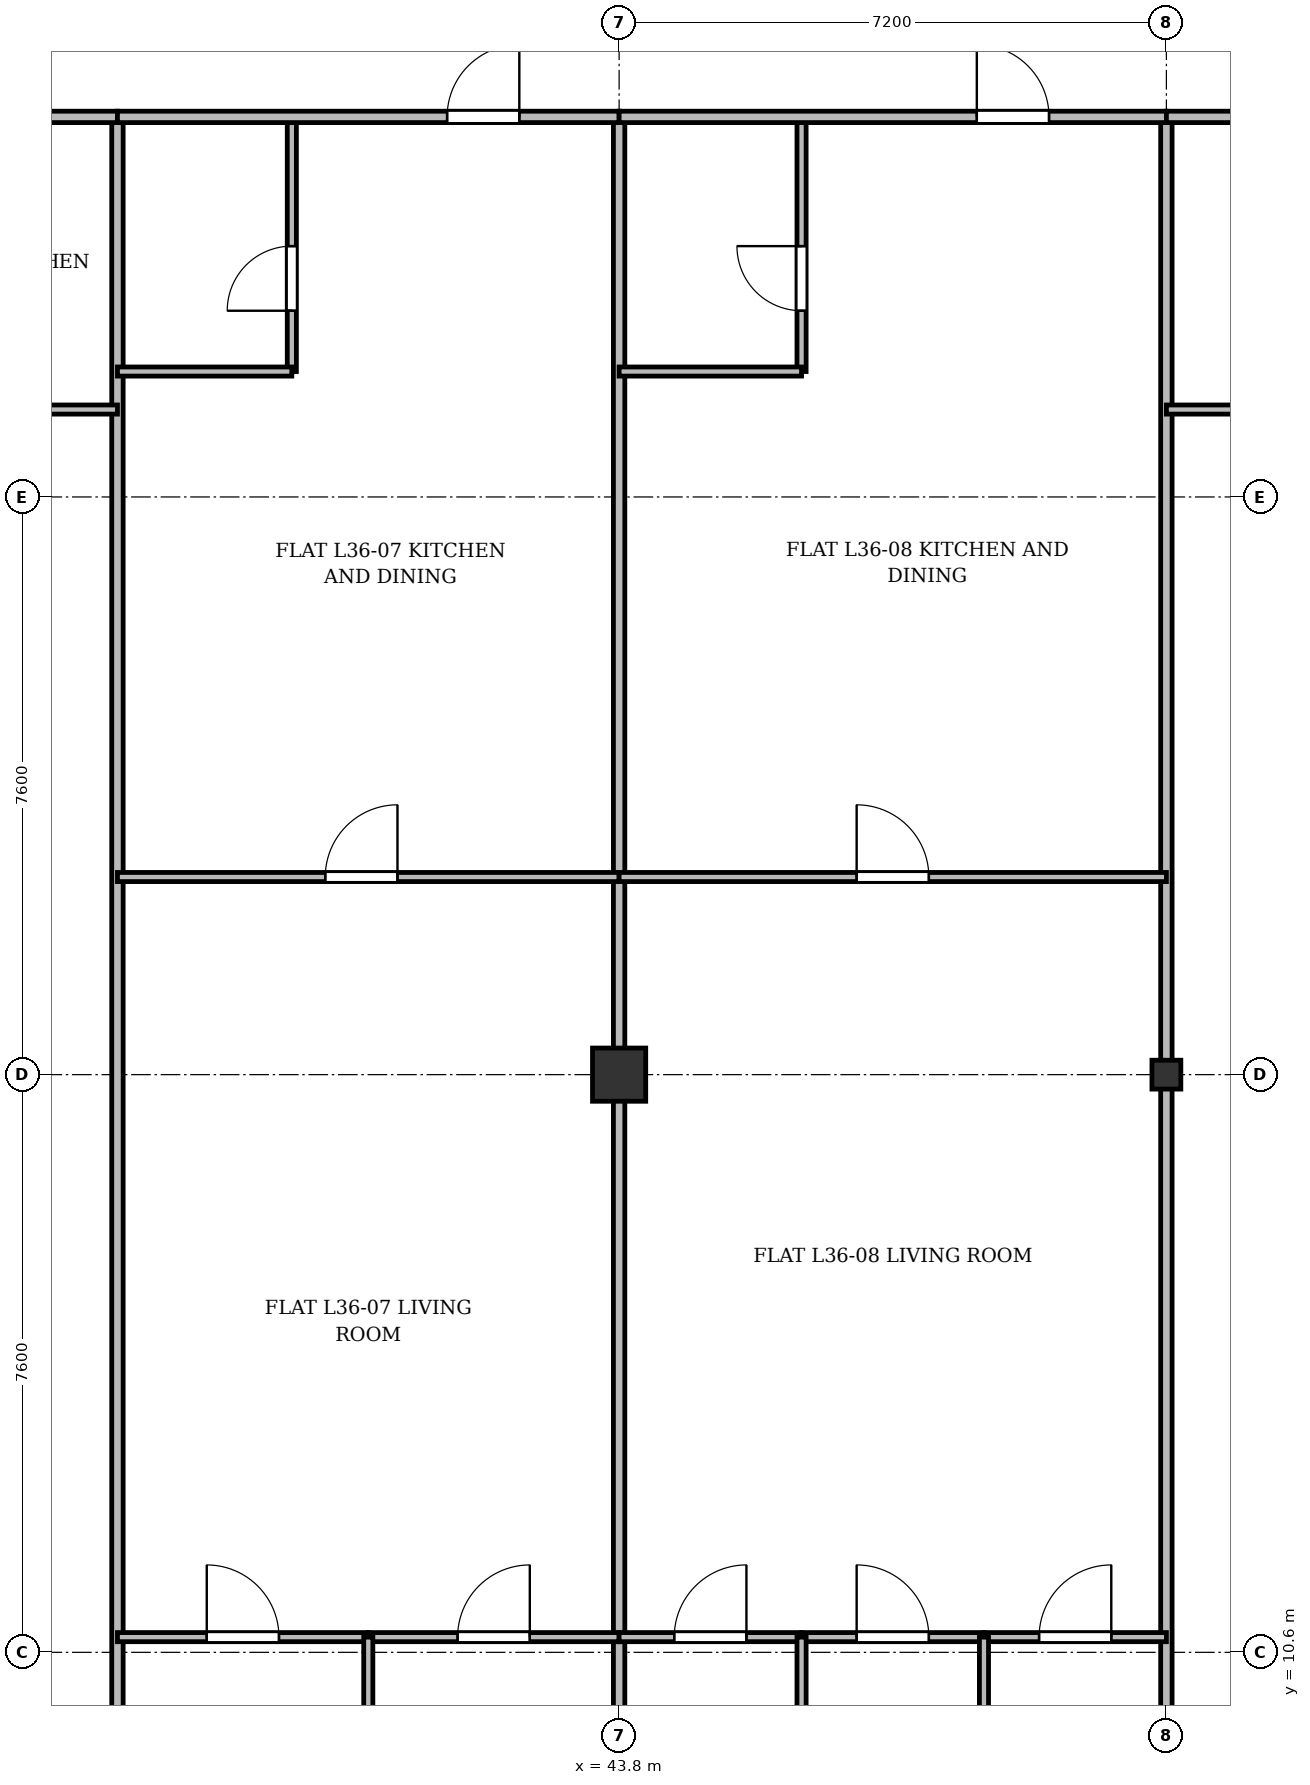
"""IFC4 building model, lengths in metres.
Left out: names, types, materials, properties, quantities, classifications, styles, units other than length and angle.
Written with IfcOpenShell. Run it as: python <this file> out.ifc"""

import sys

from ifc_helpers import new_model, si_unit, direction, frame, frame_2d, origin, origin_2d, place, context, subcontext, project, spatial, rectangle, i_section, extrude, source, transform, mapped, element, fill, save


model = new_model("IFC4")
c1 = context("Model", 3, precision=1e-05, world=origin(), true_north=direction((0.0, 1.0)))
c2 = subcontext(c1, "Body", "Model", "MODEL_VIEW")
j1 = project(units=[si_unit("LENGTHUNIT", "METRE"), si_unit("PLANEANGLEUNIT", "RADIAN")], contexts=[c1])
p1 = place(None, origin())
s1 = spatial("IfcSite", under=j1, at=p1, CompositionType="ELEMENT")
p2 = place(p1, origin())
s2 = spatial("IfcBuilding", under=s1, at=p2, CompositionType="ELEMENT")
p3 = place(p2, frame((0.0, 0.0, 139.3)))
s3 = spatial("IfcBuildingStorey", under=s2, at=p3, CompositionType="ELEMENT", Elevation=139.3)
m1 = source(origin(), c2, "Body", "SweptSolid", [
    extrude(rectangle(XDim=0.7, YDim=0.7, at=origin_2d()), origin(), (0.0, 0.0, 1.0), 3.6),
])
p4 = place(p3, frame((43.8, 18.2, 0.0), z_axis=(0.0, 0.0, 1.0), x_axis=(1.0, 0.0, 0.0)))
e1 = element("IfcColumn", 1, at=p4, inside=s3, PredefinedType="COLUMN", context=c2, shape_type="MappedRepresentation", body=[
    mapped(m1, transform((0.0, 0.0, 0.0), x_axis=(1.0, 0.0, 0.0), y_axis=(0.0, 1.0, 0.0), z_axis=(0.0, 0.0, 1.0), scale=1.0)),
])
m2 = source(origin(), c2, "Body", "SweptSolid", [
    extrude(i_section(OverallWidth=0.38, OverallDepth=0.38, WebThickness=0.02, FlangeThickness=0.03, at=origin_2d()), origin(), (0.0, 0.0, 1.0), 3.6),
])
p5 = place(p3, frame((51.0, 18.2, 0.0), z_axis=(0.0, 0.0, 1.0), x_axis=(1.0, 0.0, 0.0)))
e2 = element("IfcColumn", 2, at=p5, inside=s3, PredefinedType="COLUMN", context=c2, shape_type="MappedRepresentation", body=[
    mapped(m2, transform((0.0, 0.0, 0.0), x_axis=(1.0, 0.0, 0.0), y_axis=(0.0, 1.0, 0.0), z_axis=(0.0, 0.0, 1.0), scale=1.0)),
])
p6 = place(p3, frame((37.2, 3.525, 0.0), z_axis=(0.0, 0.0, 1.0), x_axis=(0.0, 1.0, 0.0)))
e3 = element("IfcWall", 3, at=p6, inside=s3, PredefinedType="PARTITIONING", context=c2, shape_type="SweptSolid", body=[
    extrude(rectangle(XDim=27.275, YDim=0.15, at=frame_2d((13.638, 0.0))), origin(), (0.0, 0.0, 1.0), 2.75),
])
for number, where, z_axis, x_axis in (
    (4, (43.8, 3.525, 0.0), (0.0, 0.0, 1.0), (0.0, 1.0, 0.0)),
    (5, (51.0, 3.525, 0.0), (0.0, 0.0, 1.0), (0.0, 1.0, 0.0)),
):
    element("IfcWall", number, at=place(p3, frame(where, z_axis=z_axis, x_axis=x_axis)), inside=s3, PredefinedType="PARTITIONING", context=c2, shape_type="SweptSolid", body=[
        extrude(rectangle(XDim=27.275, YDim=0.15, at=frame_2d((13.638, 0.0))), origin(), (0.0, 0.0, 1.0), 2.85),
    ])
p7 = place(p3, frame((30.6, 30.8, 0.0), z_axis=(0.0, 0.0, 1.0), x_axis=(1.0, 0.0, 0.0)))
e6 = element("IfcWall", 6, at=p7, inside=s3, PredefinedType="PARTITIONING", context=c2, shape_type="SweptSolid", body=[
    extrude(rectangle(XDim=6.6, YDim=0.15, at=frame_2d((3.3, 0.0))), origin(), (0.0, 0.0, 1.0), 2.85),
])
p8 = place(p7, frame((2.734, 0.0, 0.0)))
e7 = element("IfcOpeningElement", 7, at=p8, cuts=e6, PredefinedType="OPENING", context=c2, shape_type="SweptSolid", body=[
    extrude(rectangle(XDim=0.95, YDim=2.15, at=frame_2d((0.475, 1.075))), frame((0.0, 0.085, 0.0), z_axis=(0.0, -1.0, 0.0), x_axis=(1.0, 0.0, 0.0)), (0.0, 0.0, 1.0), 0.17),
])
p9 = place(p3, frame((30.6, 26.95, 0.0), z_axis=(0.0, 0.0, 1.0), x_axis=(1.0, 0.0, 0.0)))
e8 = element("IfcWall", 8, at=p9, inside=s3, PredefinedType="PARTITIONING", context=c2, shape_type="SweptSolid", body=[
    extrude(rectangle(XDim=6.6, YDim=0.12, at=frame_2d((3.3, 0.0))), origin(), (0.0, 0.0, 1.0), 2.85),
])
p10 = place(p9, frame((2.734, 0.0, 0.0)))
e9 = element("IfcOpeningElement", 9, at=p10, cuts=e8, PredefinedType="OPENING", context=c2, shape_type="SweptSolid", body=[
    extrude(rectangle(XDim=0.95, YDim=2.15, at=frame_2d((0.475, 1.075))), frame((0.0, 0.07, 0.0), z_axis=(0.0, -1.0, 0.0), x_axis=(1.0, 0.0, 0.0)), (0.0, 0.0, 1.0), 0.14),
])
p11 = place(p3, frame((37.2, 20.8, 0.0), z_axis=(0.0, 0.0, 1.0), x_axis=(1.0, 0.0, 0.0)))
e10 = element("IfcWall", 10, at=p11, inside=s3, PredefinedType="PARTITIONING", context=c2, shape_type="SweptSolid", body=[
    extrude(rectangle(XDim=6.6, YDim=0.12, at=frame_2d((3.3, 0.0))), origin(), (0.0, 0.0, 1.0), 2.85),
])
p12 = place(p11, frame((2.734, 0.0, 0.0)))
e11 = element("IfcOpeningElement", 11, at=p12, cuts=e10, PredefinedType="OPENING", context=c2, shape_type="SweptSolid", body=[
    extrude(rectangle(XDim=0.95, YDim=2.15, at=frame_2d((0.475, 1.075))), frame((0.0, 0.07, 0.0), z_axis=(0.0, -1.0, 0.0), x_axis=(1.0, 0.0, 0.0)), (0.0, 0.0, 1.0), 0.14),
])
p13 = place(p3, frame((39.494, 27.45, 0.0), z_axis=(0.0, 0.0, 1.0), x_axis=(0.0, 1.0, 0.0)))
e12 = element("IfcWall", 12, at=p13, inside=s3, PredefinedType="PARTITIONING", context=c2, shape_type="SweptSolid", body=[
    extrude(rectangle(XDim=3.35, YDim=0.12, at=frame_2d((1.675, 0.0))), origin(), (0.0, 0.0, 1.0), 3.35),
])
p14 = place(p13, frame((0.8, 0.0, 0.0)))
e13 = element("IfcOpeningElement", 13, at=p14, cuts=e12, PredefinedType="OPENING", context=c2, shape_type="SweptSolid", body=[
    extrude(rectangle(XDim=0.85, YDim=2.1, at=frame_2d((0.425, 1.05))), frame((0.0, 0.07, 0.0), z_axis=(0.0, -1.0, 0.0), x_axis=(1.0, 0.0, 0.0)), (0.0, 0.0, 1.0), 0.14),
])
p15 = place(p3, frame((37.2, 27.45, 0.0), z_axis=(0.0, 0.0, 1.0), x_axis=(1.0, 0.0, 0.0)))
e14 = element("IfcWall", 14, at=p15, inside=s3, PredefinedType="PARTITIONING", context=c2, shape_type="SweptSolid", body=[
    extrude(rectangle(XDim=2.294, YDim=0.12, at=frame_2d((1.147, 0.0))), origin(), (0.0, 0.0, 1.0), 3.35),
])
p16 = place(p3, frame((37.2, 30.8, 0.0), z_axis=(0.0, 0.0, 1.0), x_axis=(1.0, 0.0, 0.0)))
e15 = element("IfcWall", 15, at=p16, inside=s3, PredefinedType="PARTITIONING", context=c2, shape_type="SweptSolid", body=[
    extrude(rectangle(XDim=6.6, YDim=0.15, at=frame_2d((3.3, 0.0))), origin(), (0.0, 0.0, 1.0), 2.85),
])
p17 = place(p16, frame((4.337, 0.0, 0.0)))
e16 = element("IfcOpeningElement", 16, at=p17, cuts=e15, PredefinedType="OPENING", context=c2, shape_type="SweptSolid", body=[
    extrude(rectangle(XDim=0.95, YDim=2.15, at=frame_2d((0.475, 1.075))), frame((0.0, 0.085, 0.0), z_axis=(0.0, -1.0, 0.0), x_axis=(1.0, 0.0, 0.0)), (0.0, 0.0, 1.0), 0.17),
])
p18 = place(p3, frame((37.2, 10.8, 0.0), z_axis=(0.0, 0.0, 1.0), x_axis=(1.0, 0.0, 0.0)))
e17 = element("IfcWall", 17, at=p18, inside=s3, PredefinedType="PARTITIONING", context=c2, shape_type="SweptSolid", body=[
    extrude(rectangle(XDim=3.3, YDim=0.12, at=frame_2d((1.65, 0.0))), origin(), (0.0, 0.0, 1.0), 3.0),
])
p19 = place(p18, frame((1.175, 0.0, 0.0)))
e18 = element("IfcOpeningElement", 18, at=p19, cuts=e17, PredefinedType="OPENING", context=c2, shape_type="SweptSolid", body=[
    extrude(rectangle(XDim=0.95, YDim=2.15, at=frame_2d((0.475, 1.075))), frame((0.0, 0.07, 0.0), z_axis=(0.0, -1.0, 0.0), x_axis=(1.0, 0.0, 0.0)), (0.0, 0.0, 1.0), 0.14),
])
p20 = place(p3, frame((40.5, 10.8, 0.0), z_axis=(0.0, 0.0, 1.0), x_axis=(1.0, 0.0, 0.0)))
e19 = element("IfcWall", 19, at=p20, inside=s3, PredefinedType="PARTITIONING", context=c2, shape_type="SweptSolid", body=[
    extrude(rectangle(XDim=3.3, YDim=0.12, at=frame_2d((1.65, 0.0))), origin(), (0.0, 0.0, 1.0), 2.85),
])
p21 = place(p20, frame((1.175, 0.0, 0.0)))
e20 = element("IfcOpeningElement", 20, at=p21, cuts=e19, PredefinedType="OPENING", context=c2, shape_type="SweptSolid", body=[
    extrude(rectangle(XDim=0.95, YDim=2.15, at=frame_2d((0.475, 1.075))), frame((0.0, 0.07, 0.0), z_axis=(0.0, -1.0, 0.0), x_axis=(1.0, 0.0, 0.0)), (0.0, 0.0, 1.0), 0.14),
])
p22 = place(p3, frame((40.5, 3.525, 0.0), z_axis=(0.0, 0.0, 1.0), x_axis=(0.0, 1.0, 0.0)))
e21 = element("IfcWall", 21, at=p22, inside=s3, PredefinedType="PARTITIONING", context=c2, shape_type="SweptSolid", body=[
    extrude(rectangle(XDim=7.275, YDim=0.12, at=frame_2d((3.638, 0.0))), origin(), (0.0, 0.0, 1.0), 2.75),
])
p23 = place(p3, frame((43.8, 20.8, 0.0), z_axis=(0.0, 0.0, 1.0), x_axis=(1.0, 0.0, 0.0)))
e22 = element("IfcWall", 22, at=p23, inside=s3, PredefinedType="PARTITIONING", context=c2, shape_type="SweptSolid", body=[
    extrude(rectangle(XDim=7.2, YDim=0.12, at=frame_2d((3.6, 0.0))), origin(), (0.0, 0.0, 1.0), 2.85),
])
p24 = place(p23, frame((3.125, 0.0, 0.0)))
e23 = element("IfcOpeningElement", 23, at=p24, cuts=e22, PredefinedType="OPENING", context=c2, shape_type="SweptSolid", body=[
    extrude(rectangle(XDim=0.95, YDim=2.15, at=frame_2d((0.475, 1.075))), frame((0.0, 0.07, 0.0), z_axis=(0.0, -1.0, 0.0), x_axis=(1.0, 0.0, 0.0)), (0.0, 0.0, 1.0), 0.14),
])
p25 = place(p3, frame((46.2, 27.45, 0.0), z_axis=(0.0, 0.0, 1.0), x_axis=(0.0, 1.0, 0.0)))
e24 = element("IfcWall", 24, at=p25, inside=s3, PredefinedType="PARTITIONING", context=c2, shape_type="SweptSolid", body=[
    extrude(rectangle(XDim=3.35, YDim=0.12, at=frame_2d((1.675, 0.0))), origin(), (0.0, 0.0, 1.0), 3.35),
])
p26 = place(p25, frame((0.8, 0.0, 0.0)))
e25 = element("IfcOpeningElement", 25, at=p26, cuts=e24, PredefinedType="OPENING", context=c2, shape_type="SweptSolid", body=[
    extrude(rectangle(XDim=0.85, YDim=2.1, at=frame_2d((0.425, 1.05))), frame((0.0, 0.07, 0.0), z_axis=(0.0, -1.0, 0.0), x_axis=(1.0, 0.0, 0.0)), (0.0, 0.0, 1.0), 0.14),
])
p27 = place(p3, frame((43.8, 27.45, 0.0), z_axis=(0.0, 0.0, 1.0), x_axis=(1.0, 0.0, 0.0)))
e26 = element("IfcWall", 26, at=p27, inside=s3, PredefinedType="PARTITIONING", context=c2, shape_type="SweptSolid", body=[
    extrude(rectangle(XDim=2.4, YDim=0.12, at=frame_2d((1.2, 0.0))), origin(), (0.0, 0.0, 1.0), 2.85),
])
p28 = place(p3, frame((43.8, 30.8, 0.0), z_axis=(0.0, 0.0, 1.0), x_axis=(1.0, 0.0, 0.0)))
e27 = element("IfcWall", 27, at=p28, inside=s3, PredefinedType="PARTITIONING", context=c2, shape_type="SweptSolid", body=[
    extrude(rectangle(XDim=7.2, YDim=0.15, at=frame_2d((3.6, 0.0))), origin(), (0.0, 0.0, 1.0), 2.85),
])
p29 = place(p28, frame((4.706, 0.0, 0.0)))
e28 = element("IfcOpeningElement", 28, at=p29, cuts=e27, PredefinedType="OPENING", context=c2, shape_type="SweptSolid", body=[
    extrude(rectangle(XDim=0.95, YDim=2.15, at=frame_2d((0.475, 1.075))), frame((0.0, 0.085, 0.0), z_axis=(0.0, -1.0, 0.0), x_axis=(1.0, 0.0, 0.0)), (0.0, 0.0, 1.0), 0.17),
])
p30 = place(p3, frame((43.8, 10.8, 0.0), z_axis=(0.0, 0.0, 1.0), x_axis=(1.0, 0.0, 0.0)))
e29 = element("IfcWall", 29, at=p30, inside=s3, PredefinedType="PARTITIONING", context=c2, shape_type="SweptSolid", body=[
    extrude(rectangle(XDim=2.4, YDim=0.12, at=frame_2d((1.2, 0.0))), origin(), (0.0, 0.0, 1.0), 2.85),
])
p31 = place(p30, frame((0.725, 0.0, 0.0)))
e30 = element("IfcOpeningElement", 30, at=p31, cuts=e29, PredefinedType="OPENING", context=c2, shape_type="SweptSolid", body=[
    extrude(rectangle(XDim=0.95, YDim=2.15, at=frame_2d((0.475, 1.075))), frame((0.0, 0.07, 0.0), z_axis=(0.0, -1.0, 0.0), x_axis=(1.0, 0.0, 0.0)), (0.0, 0.0, 1.0), 0.14),
])
p32 = place(p3, frame((46.2, 10.8, 0.0), z_axis=(0.0, 0.0, 1.0), x_axis=(1.0, 0.0, 0.0)))
e31 = element("IfcWall", 31, at=p32, inside=s3, PredefinedType="PARTITIONING", context=c2, shape_type="SweptSolid", body=[
    extrude(rectangle(XDim=2.4, YDim=0.12, at=frame_2d((1.2, 0.0))), origin(), (0.0, 0.0, 1.0), 3.0),
])
p33 = place(p32, frame((0.725, 0.0, 0.0)))
e32 = element("IfcOpeningElement", 32, at=p33, cuts=e31, PredefinedType="OPENING", context=c2, shape_type="SweptSolid", body=[
    extrude(rectangle(XDim=0.95, YDim=2.15, at=frame_2d((0.475, 1.075))), frame((0.0, 0.07, 0.0), z_axis=(0.0, -1.0, 0.0), x_axis=(1.0, 0.0, 0.0)), (0.0, 0.0, 1.0), 0.14),
])
p34 = place(p3, frame((46.2, 3.525, 0.0), z_axis=(0.0, 0.0, 1.0), x_axis=(0.0, 1.0, 0.0)))
e33 = element("IfcWall", 33, at=p34, inside=s3, PredefinedType="PARTITIONING", context=c2, shape_type="SweptSolid", body=[
    extrude(rectangle(XDim=7.275, YDim=0.12, at=frame_2d((3.638, 0.0))), origin(), (0.0, 0.0, 1.0), 2.75),
])
p35 = place(p3, frame((48.6, 10.8, 0.0), z_axis=(0.0, 0.0, 1.0), x_axis=(1.0, 0.0, 0.0)))
e34 = element("IfcWall", 34, at=p35, inside=s3, PredefinedType="PARTITIONING", context=c2, shape_type="SweptSolid", body=[
    extrude(rectangle(XDim=2.4, YDim=0.12, at=frame_2d((1.2, 0.0))), origin(), (0.0, 0.0, 1.0), 2.85),
])
p36 = place(p35, frame((0.725, 0.0, 0.0)))
e35 = element("IfcOpeningElement", 35, at=p36, cuts=e34, PredefinedType="OPENING", context=c2, shape_type="SweptSolid", body=[
    extrude(rectangle(XDim=0.95, YDim=2.15, at=frame_2d((0.475, 1.075))), frame((0.0, 0.07, 0.0), z_axis=(0.0, -1.0, 0.0), x_axis=(1.0, 0.0, 0.0)), (0.0, 0.0, 1.0), 0.14),
])
p37 = place(p3, frame((48.6, 3.525, 0.0), z_axis=(0.0, 0.0, 1.0), x_axis=(0.0, 1.0, 0.0)))
e36 = element("IfcWall", 36, at=p37, inside=s3, PredefinedType="PARTITIONING", context=c2, shape_type="SweptSolid", body=[
    extrude(rectangle(XDim=7.275, YDim=0.12, at=frame_2d((3.638, 0.0))), origin(), (0.0, 0.0, 1.0), 2.75),
])
p38 = place(p3, frame((51.0, 30.8, 0.0), z_axis=(0.0, 0.0, 1.0), x_axis=(1.0, 0.0, 0.0)))
e37 = element("IfcWall", 37, at=p38, inside=s3, PredefinedType="PARTITIONING", context=c2, shape_type="SweptSolid", body=[
    extrude(rectangle(XDim=3.2, YDim=0.15, at=frame_2d((1.6, 0.0))), origin(), (0.0, 0.0, 1.0), 2.85),
])
p39 = place(p38, frame((1.125, 0.0, 0.0)))
e38 = element("IfcOpeningElement", 38, at=p39, cuts=e37, PredefinedType="OPENING", context=c2, shape_type="SweptSolid", body=[
    extrude(rectangle(XDim=0.95, YDim=2.15, at=frame_2d((0.475, 1.075))), frame((0.0, 0.085, 0.0), z_axis=(0.0, -1.0, 0.0), x_axis=(1.0, 0.0, 0.0)), (0.0, 0.0, 1.0), 0.17),
])
p40 = place(p3, frame((51.0, 26.95, 0.0), z_axis=(0.0, 0.0, 1.0), x_axis=(1.0, 0.0, 0.0)))
e39 = element("IfcWall", 39, at=p40, inside=s3, PredefinedType="PARTITIONING", context=c2, shape_type="SweptSolid", body=[
    extrude(rectangle(XDim=3.2, YDim=0.12, at=frame_2d((1.6, 0.0))), origin(), (0.0, 0.0, 1.0), 2.85),
])
p41 = place(p40, frame((1.125, 0.0, 0.0)))
e40 = element("IfcOpeningElement", 40, at=p41, cuts=e39, PredefinedType="OPENING", context=c2, shape_type="SweptSolid", body=[
    extrude(rectangle(XDim=0.95, YDim=2.15, at=frame_2d((0.475, 1.075))), frame((0.0, 0.07, 0.0), z_axis=(0.0, -1.0, 0.0), x_axis=(1.0, 0.0, 0.0)), (0.0, 0.0, 1.0), 0.14),
])
m3 = source(origin(), c2, "Body", "SweptSolid", [
    extrude(rectangle(XDim=0.95, YDim=2.15, at=frame_2d((0.475, 1.075))), frame((0.0, 0.025, 0.0), z_axis=(0.0, -1.0, 0.0), x_axis=(1.0, 0.0, 0.0)), (0.0, 0.0, 1.0), 0.05),
])
p42 = place(p12, origin())
e41 = element("IfcDoor", 41, at=p42, inside=s3, OperationType="SINGLE_SWING_RIGHT", PredefinedType="DOOR", context=c2, shape_type="MappedRepresentation", body=[
    mapped(m3, transform((0.0, 0.0, 0.0), x_axis=(1.0, 0.0, 0.0), y_axis=(0.0, 1.0, 0.0), z_axis=(0.0, 0.0, 1.0), scale=1.0)),
])
fill(e11, e41)
m4 = source(origin(), c2, "Body", "SweptSolid", [
    extrude(rectangle(XDim=0.85, YDim=2.1, at=frame_2d((0.425, 1.05))), frame((0.0, 0.025, 0.0), z_axis=(0.0, -1.0, 0.0), x_axis=(1.0, 0.0, 0.0)), (0.0, 0.0, 1.0), 0.05),
])
p43 = place(p14, origin())
e42 = element("IfcDoor", 42, at=p43, inside=s3, OperationType="SINGLE_SWING_LEFT", PredefinedType="DOOR", context=c2, shape_type="MappedRepresentation", body=[
    mapped(m4, transform((0.0, 0.0, 0.0), x_axis=(1.0, 0.0, 0.0), y_axis=(0.0, 1.0, 0.0), z_axis=(0.0, 0.0, 1.0), scale=1.0)),
])
fill(e13, e42)
p44 = place(p17, origin())
e43 = element("IfcDoor", 43, at=p44, inside=s3, OperationType="SINGLE_SWING_RIGHT", PredefinedType="DOOR", context=c2, shape_type="MappedRepresentation", body=[
    mapped(m3, transform((0.0, 0.0, 0.0), x_axis=(1.0, 0.0, 0.0), y_axis=(0.0, 1.0, 0.0), z_axis=(0.0, 0.0, 1.0), scale=1.0)),
])
fill(e16, e43)
p45 = place(p19, origin())
e44 = element("IfcDoor", 44, at=p45, inside=s3, OperationType="SINGLE_SWING_LEFT", PredefinedType="DOOR", context=c2, shape_type="MappedRepresentation", body=[
    mapped(m3, transform((0.0, 0.0, 0.0), x_axis=(1.0, 0.0, 0.0), y_axis=(0.0, 1.0, 0.0), z_axis=(0.0, 0.0, 1.0), scale=1.0)),
])
fill(e18, e44)
p46 = place(p21, origin())
e45 = element("IfcDoor", 45, at=p46, inside=s3, OperationType="SINGLE_SWING_RIGHT", PredefinedType="DOOR", context=c2, shape_type="MappedRepresentation", body=[
    mapped(m3, transform((0.0, 0.0, 0.0), x_axis=(1.0, 0.0, 0.0), y_axis=(0.0, 1.0, 0.0), z_axis=(0.0, 0.0, 1.0), scale=1.0)),
])
fill(e20, e45)
p47 = place(p24, origin())
e46 = element("IfcDoor", 46, at=p47, inside=s3, OperationType="SINGLE_SWING_LEFT", PredefinedType="DOOR", context=c2, shape_type="MappedRepresentation", body=[
    mapped(m3, transform((0.0, 0.0, 0.0), x_axis=(1.0, 0.0, 0.0), y_axis=(0.0, 1.0, 0.0), z_axis=(0.0, 0.0, 1.0), scale=1.0)),
])
fill(e23, e46)
p48 = place(p26, origin())
e47 = element("IfcDoor", 47, at=p48, inside=s3, OperationType="SINGLE_SWING_RIGHT", PredefinedType="DOOR", context=c2, shape_type="MappedRepresentation", body=[
    mapped(m4, transform((0.0, 0.0, 0.0), x_axis=(1.0, 0.0, 0.0), y_axis=(0.0, 1.0, 0.0), z_axis=(0.0, 0.0, 1.0), scale=1.0)),
])
fill(e25, e47)
p49 = place(p29, origin())
e48 = element("IfcDoor", 48, at=p49, inside=s3, OperationType="SINGLE_SWING_LEFT", PredefinedType="DOOR", context=c2, shape_type="MappedRepresentation", body=[
    mapped(m3, transform((0.0, 0.0, 0.0), x_axis=(1.0, 0.0, 0.0), y_axis=(0.0, 1.0, 0.0), z_axis=(0.0, 0.0, 1.0), scale=1.0)),
])
fill(e28, e48)
p50 = place(p31, origin())
e49 = element("IfcDoor", 49, at=p50, inside=s3, OperationType="SINGLE_SWING_RIGHT", PredefinedType="DOOR", context=c2, shape_type="MappedRepresentation", body=[
    mapped(m3, transform((0.0, 0.0, 0.0), x_axis=(1.0, 0.0, 0.0), y_axis=(0.0, 1.0, 0.0), z_axis=(0.0, 0.0, 1.0), scale=1.0)),
])
fill(e30, e49)
p51 = place(p33, origin())
e50 = element("IfcDoor", 50, at=p51, inside=s3, OperationType="SINGLE_SWING_LEFT", PredefinedType="DOOR", context=c2, shape_type="MappedRepresentation", body=[
    mapped(m3, transform((0.0, 0.0, 0.0), x_axis=(1.0, 0.0, 0.0), y_axis=(0.0, 1.0, 0.0), z_axis=(0.0, 0.0, 1.0), scale=1.0)),
])
fill(e32, e50)
p52 = place(p36, origin())
e51 = element("IfcDoor", 51, at=p52, inside=s3, OperationType="SINGLE_SWING_RIGHT", PredefinedType="DOOR", context=c2, shape_type="MappedRepresentation", body=[
    mapped(m3, transform((0.0, 0.0, 0.0), x_axis=(1.0, 0.0, 0.0), y_axis=(0.0, 1.0, 0.0), z_axis=(0.0, 0.0, 1.0), scale=1.0)),
])
fill(e35, e51)
save(model, sys.argv[1])
